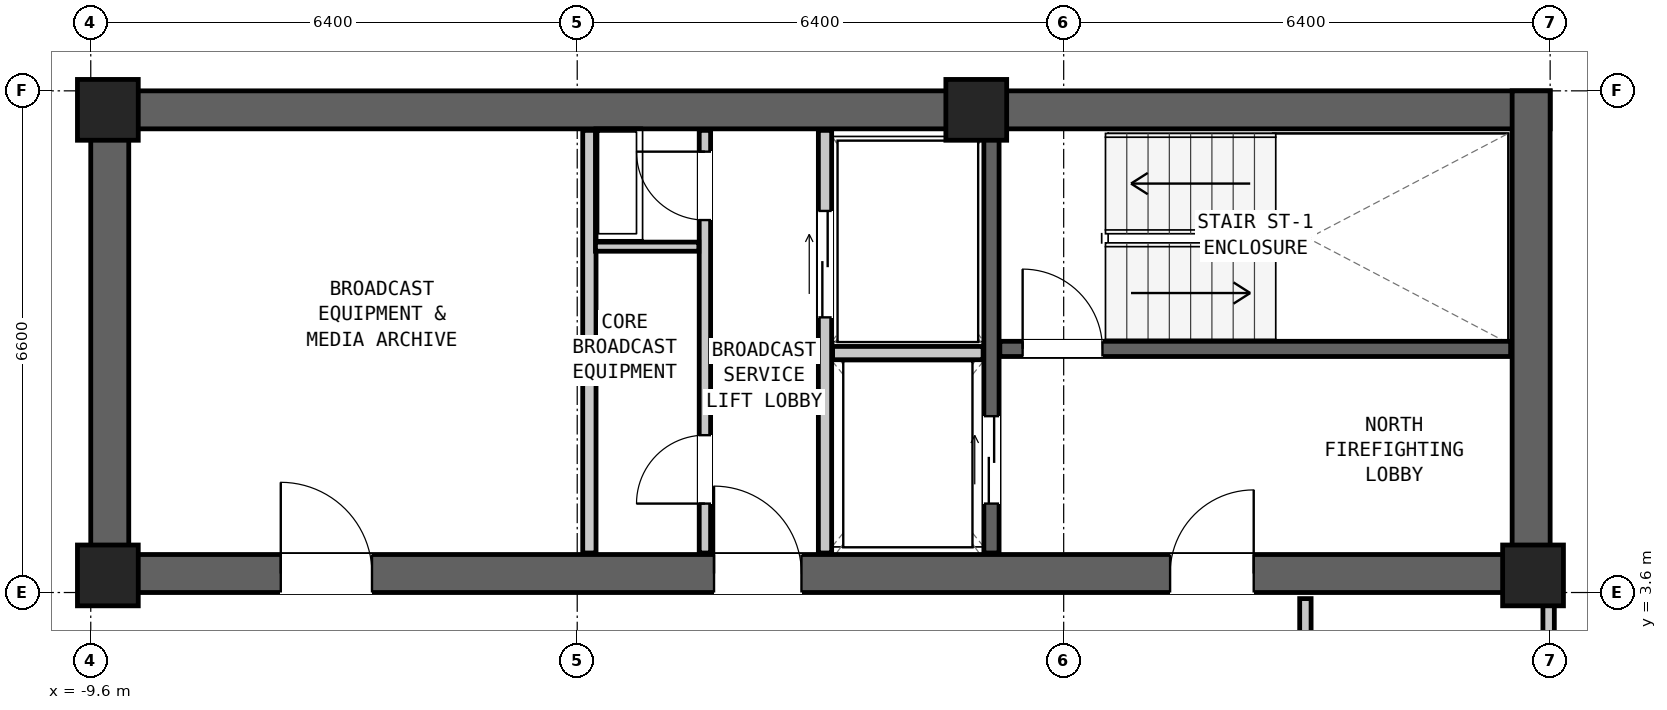
"""IFC4 building model, lengths in metres.
Left out: names, types, materials, properties, quantities, classifications, styles, units other than length and angle.
Written with IfcOpenShell. Run it as: python <this file> out.ifc"""

import sys

from ifc_helpers import new_model, si_unit, direction, frame, frame_2d, origin, origin_2d, place, context, subcontext, project, spatial, rectangle, extrude, element, fill, save


model = new_model("IFC4")
c1 = context("Model", 3, precision=1e-05, world=origin(), true_north=direction((0.0, 1.0)))
c2 = subcontext(c1, "Body", "Model", "MODEL_VIEW")
j1 = project(units=[si_unit("LENGTHUNIT", "METRE"), si_unit("PLANEANGLEUNIT", "RADIAN")], contexts=[c1])
p1 = place(None, origin())
s1 = spatial("IfcSite", under=j1, at=p1, CompositionType="ELEMENT")
p2 = place(p1, origin())
s2 = spatial("IfcBuilding", under=s1, at=p2, CompositionType="ELEMENT")
p3 = place(p2, frame((0.0, 0.0, 131.1)))
s3 = spatial("IfcBuildingStorey", under=s2, at=p3, CompositionType="ELEMENT", Elevation=131.1)
p4 = place(p3, frame((-9.6, 9.95, 0.0), z_axis=(0.0, 0.0, 1.0), x_axis=(1.0, 0.0, 0.0)))
e1 = element("IfcWall", 1, at=p4, inside=s3, PredefinedType="SHEAR", context=c2, shape_type="SweptSolid", body=[
    extrude(rectangle(XDim=19.2, YDim=0.5, at=frame_2d((9.6, 0.0))), origin(), (0.0, 0.0, 1.0), 3.05),
])
p5 = place(p3, frame((-9.6, 3.85, 0.0), z_axis=(0.0, 0.0, 1.0), x_axis=(1.0, 0.0, 0.0)))
e2 = element("IfcWall", 2, at=p5, inside=s3, PredefinedType="SHEAR", context=c2, shape_type="SweptSolid", body=[
    extrude(rectangle(XDim=19.2, YDim=0.5, at=frame_2d((9.6, 0.0))), origin(), (0.0, 0.0, 1.0), 3.05),
])
p6 = place(p5, frame((14.2, 0.0, 0.0)))
e3 = element("IfcOpeningElement", 3, at=p6, cuts=e2, PredefinedType="OPENING", context=c2, shape_type="SweptSolid", body=[
    extrude(rectangle(XDim=1.1, YDim=2.08, at=frame_2d((0.55, 1.04))), frame((0.0, 0.262, 0.0), z_axis=(0.0, -1.0, 0.0), x_axis=(1.0, 0.0, 0.0)), (0.0, 0.0, 1.0), 0.524),
])
p7 = place(p5, frame((8.2, 0.0, 0.0)))
e4 = element("IfcOpeningElement", 4, at=p7, cuts=e2, PredefinedType="OPENING", context=c2, shape_type="SweptSolid", body=[
    extrude(rectangle(XDim=1.15, YDim=2.1, at=frame_2d((0.575, 1.05))), frame((0.0, 0.262, 0.0), z_axis=(0.0, -1.0, 0.0), x_axis=(1.0, 0.0, 0.0)), (0.0, 0.0, 1.0), 0.524),
])
p8 = place(p5, frame((2.5, 0.0, 0.0)))
e5 = element("IfcOpeningElement", 5, at=p8, cuts=e2, PredefinedType="OPENING", context=c2, shape_type="SweptSolid", body=[
    extrude(rectangle(XDim=1.2, YDim=2.1, at=frame_2d((0.6, 1.05))), frame((0.0, 0.262, 0.0), z_axis=(0.0, -1.0, 0.0), x_axis=(1.0, 0.0, 0.0)), (0.0, 0.0, 1.0), 0.524),
])
for number, where, z_axis, x_axis in (
    (6, (-9.35, 3.6, 0.0), (0.0, 0.0, 1.0), (0.0, 1.0, 0.0)),
    (7, (9.35, 3.6, 0.0), (0.0, 0.0, 1.0), (0.0, 1.0, 0.0)),
):
    element("IfcWall", number, at=place(p3, frame(where, z_axis=z_axis, x_axis=x_axis)), inside=s3, PredefinedType="SHEAR", context=c2, shape_type="SweptSolid", body=[
        extrude(rectangle(XDim=6.6, YDim=0.5, at=frame_2d((3.3, 0.0))), origin(), (0.0, 0.0, 1.0), 3.05),
    ])
for number, where, z_axis, x_axis in (
    (8, (-9.375, 9.95, 0.0), (0.0, 0.0, 1.0), (1.0, 0.0, 0.0)),
    (9, (2.05, 9.95, 0.0), (0.0, 0.0, 1.0), (1.0, 0.0, 0.0)),
    (10, (-9.375, 3.825, 0.0), (0.0, 0.0, 1.0), (1.0, 0.0, 0.0)),
    (11, (9.375, 3.825, 0.0), (0.0, 0.0, 1.0), (1.0, 0.0, 0.0)),
):
    element("IfcColumn", number, at=place(p3, frame(where, z_axis=z_axis, x_axis=x_axis)), inside=s3, PredefinedType="COLUMN", context=c2, shape_type="SweptSolid", body=[
        extrude(rectangle(XDim=0.8, YDim=0.8, at=origin_2d()), origin(), (0.0, 0.0, 1.0), 3.05),
    ])
p9 = place(p3, frame((2.36, 6.805, 0.0), z_axis=(0.0, 0.0, 1.0), x_axis=(1.0, 0.0, 0.0)))
e12 = element("IfcWall", 12, at=p9, inside=s3, PredefinedType="SHEAR", context=c2, shape_type="SweptSolid", body=[
    extrude(rectangle(XDim=6.72, YDim=0.2, at=frame_2d((3.36, 0.0))), origin(), (0.0, 0.0, 1.0), 2.83),
])
p10 = place(p9, frame((0.3, 0.0, 0.0)))
e13 = element("IfcOpeningElement", 13, at=p10, cuts=e12, PredefinedType="OPENING", context=c2, shape_type="SweptSolid", body=[
    extrude(rectangle(XDim=1.05, YDim=2.08, at=frame_2d((0.525, 1.04))), frame((0.0, 0.112, 0.0), z_axis=(0.0, -1.0, 0.0), x_axis=(1.0, 0.0, 0.0)), (0.0, 0.0, 1.0), 0.224),
])
p11 = place(p3, frame((2.25, 4.12, 0.0), z_axis=(0.0, 0.0, 1.0), x_axis=(0.0, 1.0, 0.0)))
e14 = element("IfcWall", 14, at=p11, inside=s3, PredefinedType="SHEAR", context=c2, shape_type="SweptSolid", body=[
    extrude(rectangle(XDim=5.56, YDim=0.2, at=frame_2d((2.78, 0.0))), origin(), (0.0, 0.0, 1.0), 2.83),
])
p12 = place(p11, frame((0.65, 0.0, 0.0)))
e15 = element("IfcOpeningElement", 15, at=p12, cuts=e14, PredefinedType="OPENING", context=c2, shape_type="SweptSolid", body=[
    extrude(rectangle(XDim=1.15, YDim=2.08, at=frame_2d((0.575, 1.04))), frame((0.0, 0.112, 0.0), z_axis=(0.0, -1.0, 0.0), x_axis=(1.0, 0.0, 0.0)), (0.0, 0.0, 1.0), 0.224),
])
p13 = place(p3, frame((0.06, 4.12, 0.0), z_axis=(0.0, 0.0, 1.0), x_axis=(0.0, 1.0, 0.0)))
e16 = element("IfcWall", 16, at=p13, inside=s3, PredefinedType="PARTITIONING", context=c2, shape_type="SweptSolid", body=[
    extrude(rectangle(XDim=5.56, YDim=0.175, at=frame_2d((2.78, 0.0))), origin(), (0.0, 0.0, 1.0), 2.83),
])
p14 = place(p13, frame((3.1, 0.0, 0.0)))
e17 = element("IfcOpeningElement", 17, at=p14, cuts=e16, PredefinedType="OPENING", context=c2, shape_type="SweptSolid", body=[
    extrude(rectangle(XDim=1.4, YDim=2.12, at=frame_2d((0.7, 1.06))), frame((0.0, 0.1, 0.0), z_axis=(0.0, -1.0, 0.0), x_axis=(1.0, 0.0, 0.0)), (0.0, 0.0, 1.0), 0.199),
])
p15 = place(p3, frame((0.16, 6.75, 0.0), z_axis=(0.0, 0.0, 1.0), x_axis=(1.0, 0.0, 0.0)))
e18 = element("IfcWall", 18, at=p15, inside=s3, PredefinedType="PARTITIONING", context=c2, shape_type="SweptSolid", body=[
    extrude(rectangle(XDim=1.98, YDim=0.175, at=frame_2d((0.99, 0.0))), origin(), (0.0, 0.0, 1.0), 2.83),
])
p16 = place(p3, frame((-3.04, 4.12, 0.0), z_axis=(0.0, 0.0, 1.0), x_axis=(0.0, 1.0, 0.0)))
e19 = element("IfcWall", 19, at=p16, inside=s3, PredefinedType="PARTITIONING", context=c2, shape_type="SweptSolid", body=[
    extrude(rectangle(XDim=5.56, YDim=0.175, at=frame_2d((2.78, 0.0))), origin(), (0.0, 0.0, 1.0), 2.83),
])
p17 = place(p3, frame((-1.52, 4.12, 0.0), z_axis=(0.0, 0.0, 1.0), x_axis=(0.0, 1.0, 0.0)))
e20 = element("IfcWall", 20, at=p17, inside=s3, PredefinedType="PARTITIONING", context=c2, shape_type="SweptSolid", body=[
    extrude(rectangle(XDim=5.56, YDim=0.15, at=frame_2d((2.78, 0.0))), origin(), (0.0, 0.0, 1.0), 2.83),
])
p18 = place(p17, frame((4.38, 0.0, 0.0)))
e21 = element("IfcOpeningElement", 21, at=p18, cuts=e20, PredefinedType="OPENING", context=c2, shape_type="SweptSolid", body=[
    extrude(rectangle(XDim=0.9, YDim=2.05, at=frame_2d((0.45, 1.025))), frame((0.0, 0.087, 0.0), z_axis=(0.0, -1.0, 0.0), x_axis=(1.0, 0.0, 0.0)), (0.0, 0.0, 1.0), 0.174),
])
p19 = place(p17, frame((0.65, 0.0, 0.0)))
e22 = element("IfcOpeningElement", 22, at=p19, cuts=e20, PredefinedType="OPENING", context=c2, shape_type="SweptSolid", body=[
    extrude(rectangle(XDim=0.9, YDim=2.05, at=frame_2d((0.45, 1.025))), frame((0.0, 0.087, 0.0), z_axis=(0.0, -1.0, 0.0), x_axis=(1.0, 0.0, 0.0)), (0.0, 0.0, 1.0), 0.174),
])
p20 = place(p3, frame((-2.96, 8.15, 0.0), z_axis=(0.0, 0.0, 1.0), x_axis=(1.0, 0.0, 0.0)))
e23 = element("IfcWall", 23, at=p20, inside=s3, PredefinedType="PARTITIONING", context=c2, shape_type="SweptSolid", body=[
    extrude(rectangle(XDim=1.36, YDim=0.12, at=frame_2d((0.68, 0.0))), origin(), (0.0, 0.0, 1.0), 2.83),
])
p21 = place(p3, frame((6.38, -2.32, 0.0), z_axis=(0.0, 0.0, 1.0), x_axis=(0.0, 1.0, 0.0)))
e24 = element("IfcWall", 24, at=p21, inside=s3, PredefinedType="PARTITIONING", context=c2, shape_type="SweptSolid", body=[
    extrude(rectangle(XDim=5.84, YDim=0.15, at=frame_2d((2.92, 0.0))), origin(), (0.0, 0.0, 1.0), 2.198),
])
p22 = place(p3, frame((9.58, -2.32, 0.0), z_axis=(0.0, 0.0, 1.0), x_axis=(0.0, 1.0, 0.0)))
e25 = element("IfcWall", 25, at=p22, inside=s3, PredefinedType="PARTITIONING", context=c2, shape_type="SweptSolid", body=[
    extrude(rectangle(XDim=5.84, YDim=0.15, at=frame_2d((2.92, 0.0))), origin(), (0.0, 0.0, 1.0), 2.198),
])
p23 = place(p22, frame((2.445, 0.0, 0.0)))
e26 = element("IfcOpeningElement", 26, at=p23, cuts=e25, PredefinedType="OPENING", context=c2, shape_type="SweptSolid", body=[
    extrude(rectangle(XDim=0.95, YDim=2.1, at=frame_2d((0.475, 1.05))), frame((0.0, 0.087, 0.0), z_axis=(0.0, -1.0, 0.0), x_axis=(1.0, 0.0, 0.0)), (0.0, 0.0, 1.0), 0.174),
])
p24 = place(p10, origin())
e27 = element("IfcDoor", 27, at=p24, inside=s3, OperationType="SINGLE_SWING_LEFT", PredefinedType="DOOR", context=c2, shape_type="SweptSolid", body=[
    extrude(rectangle(XDim=1.05, YDim=2.08, at=frame_2d((0.525, 1.04))), frame((0.0, 0.025, 0.0), z_axis=(0.0, -1.0, 0.0), x_axis=(1.0, 0.0, 0.0)), (0.0, 0.0, 1.0), 0.05),
])
fill(e13, e27)
p25 = place(p6, origin())
e28 = element("IfcDoor", 28, at=p25, inside=s3, OperationType="SINGLE_SWING_RIGHT", PredefinedType="DOOR", context=c2, shape_type="SweptSolid", body=[
    extrude(rectangle(XDim=1.1, YDim=2.08, at=frame_2d((0.55, 1.04))), frame((0.0, 0.025, 0.0), z_axis=(0.0, -1.0, 0.0), x_axis=(1.0, 0.0, 0.0)), (0.0, 0.0, 1.0), 0.05),
])
fill(e3, e28)
p26 = place(p12, origin())
e29 = element("IfcDoor", 29, at=p26, inside=s3, OperationType="DOUBLE_DOOR_SLIDING", PredefinedType="DOOR", context=c2, shape_type="SweptSolid", body=[
    extrude(rectangle(XDim=1.15, YDim=2.08, at=frame_2d((0.575, 1.04))), frame((0.0, 0.025, 0.0), z_axis=(0.0, -1.0, 0.0), x_axis=(1.0, 0.0, 0.0)), (0.0, 0.0, 1.0), 0.05),
])
fill(e15, e29)
p27 = place(p14, origin())
e30 = element("IfcDoor", 30, at=p27, inside=s3, OperationType="DOUBLE_DOOR_SLIDING", PredefinedType="DOOR", context=c2, shape_type="SweptSolid", body=[
    extrude(rectangle(XDim=1.4, YDim=2.12, at=frame_2d((0.7, 1.06))), frame((0.0, 0.025, 0.0), z_axis=(0.0, -1.0, 0.0), x_axis=(1.0, 0.0, 0.0)), (0.0, 0.0, 1.0), 0.05),
])
fill(e17, e30)
p28 = place(p7, origin())
e31 = element("IfcDoor", 31, at=p28, inside=s3, OperationType="SINGLE_SWING_LEFT", PredefinedType="DOOR", context=c2, shape_type="SweptSolid", body=[
    extrude(rectangle(XDim=1.15, YDim=2.1, at=frame_2d((0.575, 1.05))), frame((0.0, 0.025, 0.0), z_axis=(0.0, -1.0, 0.0), x_axis=(1.0, 0.0, 0.0)), (0.0, 0.0, 1.0), 0.05),
])
fill(e4, e31)
p29 = place(p18, origin())
e32 = element("IfcDoor", 32, at=p29, inside=s3, OperationType="SINGLE_SWING_RIGHT", PredefinedType="DOOR", context=c2, shape_type="SweptSolid", body=[
    extrude(rectangle(XDim=0.9, YDim=2.05, at=frame_2d((0.45, 1.025))), frame((0.0, 0.025, 0.0), z_axis=(0.0, -1.0, 0.0), x_axis=(1.0, 0.0, 0.0)), (0.0, 0.0, 1.0), 0.05),
])
fill(e21, e32)
p30 = place(p19, origin())
e33 = element("IfcDoor", 33, at=p30, inside=s3, OperationType="SINGLE_SWING_LEFT", PredefinedType="DOOR", context=c2, shape_type="SweptSolid", body=[
    extrude(rectangle(XDim=0.9, YDim=2.05, at=frame_2d((0.45, 1.025))), frame((0.0, 0.025, 0.0), z_axis=(0.0, -1.0, 0.0), x_axis=(1.0, 0.0, 0.0)), (0.0, 0.0, 1.0), 0.05),
])
fill(e22, e33)
p31 = place(p8, origin())
e34 = element("IfcDoor", 34, at=p31, inside=s3, OperationType="SINGLE_SWING_LEFT", PredefinedType="DOOR", context=c2, shape_type="SweptSolid", body=[
    extrude(rectangle(XDim=1.2, YDim=2.1, at=frame_2d((0.6, 1.05))), frame((0.0, 0.025, 0.0), z_axis=(0.0, -1.0, 0.0), x_axis=(1.0, 0.0, 0.0)), (0.0, 0.0, 1.0), 0.05),
])
fill(e5, e34)
save(model, sys.argv[1])
